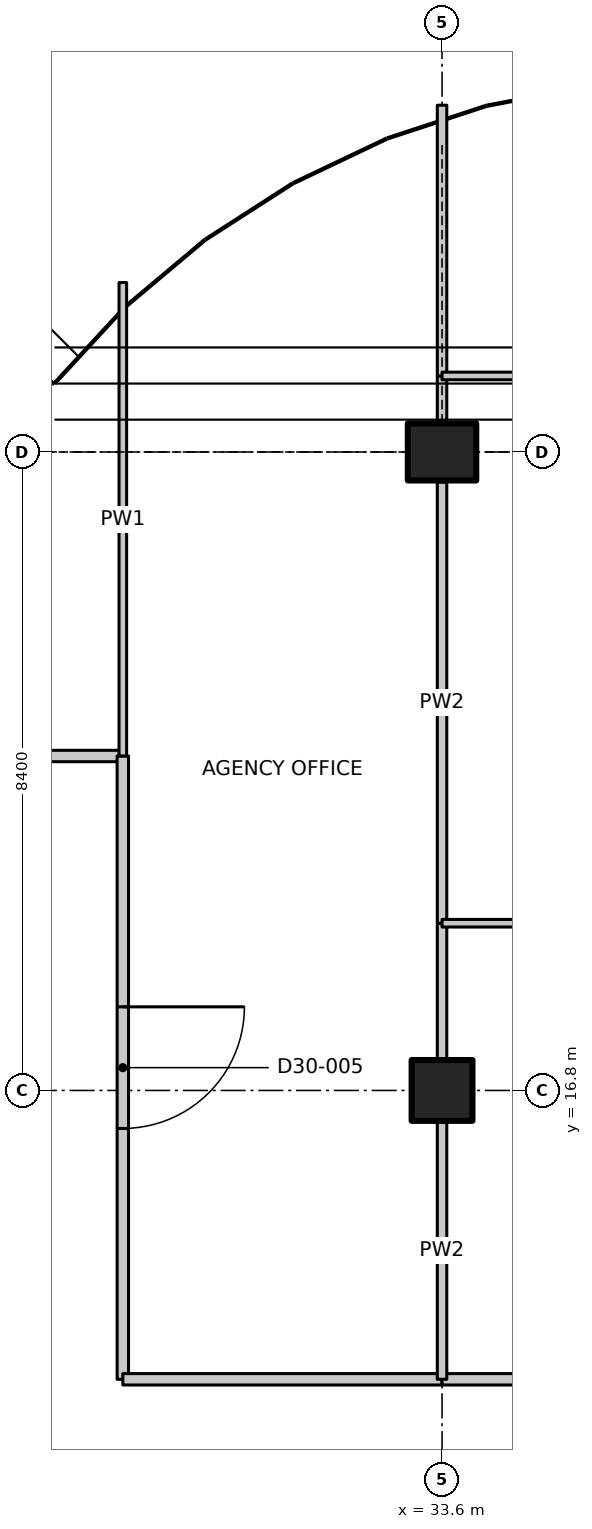
"""IFC4 building model, lengths in metres.
Left out: names, types, materials, properties, quantities, classifications, styles, units other than length and angle.
Written with IfcOpenShell. Run it as: python <this file> out.ifc"""

import sys

from ifc_helpers import new_model, si_unit, direction, frame, frame_2d, origin, origin_2d, place, context, subcontext, project, spatial, polyline, rectangle, outline, extrude, element, fill, save


model = new_model("IFC4")
c1 = context("Model", 3, precision=1e-05, world=origin(), true_north=direction((0.0, 1.0)))
c2 = subcontext(c1, "Body", "Model", "MODEL_VIEW")
j1 = project(units=[si_unit("LENGTHUNIT", "METRE"), si_unit("PLANEANGLEUNIT", "RADIAN")], contexts=[c1])
p1 = place(None, origin())
s1 = spatial("IfcSite", under=j1, at=p1, CompositionType="ELEMENT")
p2 = place(p1, origin())
s2 = spatial("IfcBuilding", under=s1, at=p2, CompositionType="ELEMENT")
p3 = place(p2, frame((0.0, 0.0, 244.5)))
s3 = spatial("IfcBuildingStorey", under=s2, at=p3, CompositionType="ELEMENT", Elevation=244.5)
p4 = place(p3, frame((33.6, 16.8, 0.0), z_axis=(0.0, 0.0, 1.0), x_axis=(1.0, 0.0, 0.0)))
e1 = element("IfcColumn", 1, at=p4, inside=s3, PredefinedType="COLUMN", context=c2, shape_type="SweptSolid", body=[
    extrude(rectangle(XDim=0.8, YDim=0.8, at=origin_2d()), origin(), (0.0, 0.0, 1.0), 3.35),
])
p5 = place(p3, frame((33.6, 25.2, 0.0), z_axis=(0.0, 0.0, 1.0), x_axis=(0.0, 1.0, 0.0)))
e2 = element("IfcColumn", 2, at=p5, inside=s3, PredefinedType="COLUMN", context=c2, shape_type="SweptSolid", body=[
    extrude(rectangle(XDim=0.75, YDim=0.9, at=origin_2d()), origin(), (0.0, 0.0, 1.0), 3.35),
])
p6 = place(p3, frame((25.2, 21.2, 0.0), z_axis=(0.0, 0.0, 1.0), x_axis=(1.0, 0.0, 0.0)))
e3 = element("IfcWall", 3, at=p6, inside=s3, PredefinedType="PARTITIONING", context=c2, shape_type="SweptSolid", body=[
    extrude(rectangle(XDim=4.2, YDim=0.15, at=frame_2d((2.1, 0.0))), origin(), (0.0, 0.0, 1.0), 3.33),
])
p7 = place(p6, frame((1.5, 0.0, 0.0)))
e4 = element("IfcOpeningElement", 4, at=p7, cuts=e3, PredefinedType="OPENING", context=c2, shape_type="SweptSolid", body=[
    extrude(rectangle(XDim=1.0, YDim=2.1, at=frame_2d((0.5, 1.05))), frame((0.0, 0.085, 0.0), z_axis=(0.0, -1.0, 0.0), x_axis=(1.0, 0.0, 0.0)), (0.0, 0.0, 1.0), 0.17),
])
p8 = place(p3, frame((29.4, 21.2, 0.0), z_axis=(0.0, 0.0, 1.0), x_axis=(0.0, -1.0, 0.0)))
e5 = element("IfcWall", 5, at=p8, inside=s3, PredefinedType="PARTITIONING", context=c2, shape_type="SweptSolid", body=[
    extrude(rectangle(XDim=8.2, YDim=0.15, at=frame_2d((4.1, 0.0))), origin(), (0.0, 0.0, 1.0), 3.33),
])
p9 = place(p8, frame((3.3, 0.0, 0.0)))
e6 = element("IfcOpeningElement", 6, at=p9, cuts=e5, PredefinedType="OPENING", context=c2, shape_type="SweptSolid", body=[
    extrude(rectangle(XDim=1.6, YDim=2.1, at=frame_2d((0.8, 1.05))), frame((0.0, 0.085, 0.0), z_axis=(0.0, -1.0, 0.0), x_axis=(1.0, 0.0, 0.0)), (0.0, 0.0, 1.0), 0.17),
])
p10 = place(p3, frame((29.4, 27.429, 0.0), z_axis=(0.0, 0.0, 1.0), x_axis=(0.0, -1.0, 0.0)))
e7 = element("IfcWall", 7, at=p10, inside=s3, PredefinedType="PARTITIONING", context=c2, shape_type="SweptSolid", body=[
    extrude(outline(polyline([(0.0, 0.0), (6.229, 0.0), (6.229, 3.33), (2.679, 3.33), (2.677, 2.98), (1.781, 2.98), (1.779, 3.33), (0.154, 3.33), (0.0, 3.33), (0.0, 0.0)])), frame((0.0, 0.05, 0.0), z_axis=(0.0, -1.0, 0.0), x_axis=(1.0, 0.0, 0.0)), (0.0, 0.0, 1.0), 0.1),
])
p11 = place(p3, frame((29.4, 13.0, 0.0), z_axis=(0.0, 0.0, 1.0), x_axis=(1.0, 0.0, 0.0)))
e8 = element("IfcWall", 8, at=p11, inside=s3, PredefinedType="PARTITIONING", context=c2, shape_type="SweptSolid", body=[
    extrude(rectangle(XDim=4.2, YDim=0.15, at=frame_2d((2.1, 0.0))), origin(), (0.0, 0.0, 1.0), 3.33),
])
p12 = place(p3, frame((33.6, 13.0, 0.0), z_axis=(0.0, 0.0, 1.0), x_axis=(1.0, 0.0, 0.0)))
e9 = element("IfcWall", 9, at=p12, inside=s3, PredefinedType="PARTITIONING", context=c2, shape_type="SweptSolid", body=[
    extrude(rectangle(XDim=4.2, YDim=0.15, at=frame_2d((2.1, 0.0))), origin(), (0.0, 0.0, 1.0), 3.33),
])
p13 = place(p3, frame((33.6, 19.0, 0.0), z_axis=(0.0, 0.0, 1.0), x_axis=(0.0, -1.0, 0.0)))
e10 = element("IfcWall", 10, at=p13, inside=s3, PredefinedType="PARTITIONING", context=c2, shape_type="SweptSolid", body=[
    extrude(rectangle(XDim=1.78, YDim=0.125, at=frame_2d((0.89, 0.0))), origin(), (0.0, 0.0, 1.0), 3.33),
])
p14 = place(p3, frame((33.6, 16.38, 0.0), z_axis=(0.0, 0.0, 1.0), x_axis=(0.0, -1.0, 0.0)))
e11 = element("IfcWall", 11, at=p14, inside=s3, PredefinedType="PARTITIONING", context=c2, shape_type="SweptSolid", body=[
    extrude(rectangle(XDim=3.38, YDim=0.125, at=frame_2d((1.69, 0.0))), origin(), (0.0, 0.0, 1.0), 3.33),
])
p15 = place(p3, frame((33.6, 26.2, 0.0), z_axis=(0.0, 0.0, 1.0), x_axis=(0.0, -1.0, 0.0)))
e12 = element("IfcWall", 12, at=p15, inside=s3, PredefinedType="PARTITIONING", context=c2, shape_type="SweptSolid", body=[
    extrude(rectangle(XDim=0.605, YDim=0.125, at=frame_2d((0.302, 0.0))), origin(), (0.0, 0.0, 1.0), 2.98),
])
p16 = place(p3, frame((33.6, 24.805, 0.0), z_axis=(0.0, 0.0, 1.0), x_axis=(0.0, -1.0, 0.0)))
e13 = element("IfcWall", 13, at=p16, inside=s3, PredefinedType="PARTITIONING", context=c2, shape_type="SweptSolid", body=[
    extrude(outline(polyline([(0.0, 0.0), (5.805, 0.0), (5.805, 3.33), (0.055, 3.33), (0.053, 2.98), (0.0, 2.98), (0.0, 0.0)])), frame((0.0, 0.062, 0.0), z_axis=(0.0, -1.0, 0.0), x_axis=(1.0, 0.0, 0.0)), (0.0, 0.0, 1.0), 0.125),
])
p17 = place(p3, frame((33.6, 29.762, 0.0), z_axis=(0.0, 0.0, 1.0), x_axis=(0.0, -1.0, 0.0)))
e14 = element("IfcWall", 14, at=p17, inside=s3, PredefinedType="PARTITIONING", context=c2, shape_type="SweptSolid", body=[
    extrude(rectangle(XDim=3.562, YDim=0.125, at=frame_2d((1.781, 0.0))), origin(), (0.0, 0.0, 1.0), 2.98),
])
p18 = place(p3, frame((33.6, 19.0, 0.0), z_axis=(0.0, 0.0, 1.0), x_axis=(1.0, 0.0, 0.0)))
e15 = element("IfcWall", 15, at=p18, inside=s3, PredefinedType="PARTITIONING", context=c2, shape_type="SweptSolid", body=[
    extrude(rectangle(XDim=4.2, YDim=0.1, at=frame_2d((2.1, 0.0))), origin(), (0.0, 0.0, 1.0), 3.33),
])
p19 = place(p3, frame((33.6, 26.2, 0.0), z_axis=(0.0, 0.0, 1.0), x_axis=(1.0, 0.0, 0.0)))
e16 = element("IfcWall", 16, at=p19, inside=s3, PredefinedType="PARTITIONING", context=c2, shape_type="SweptSolid", body=[
    extrude(rectangle(XDim=4.2, YDim=0.1, at=frame_2d((2.1, 0.0))), origin(), (0.0, 0.0, 1.0), 2.98),
])
p20 = place(p19, frame((1.8, 0.0, 0.0)))
e17 = element("IfcOpeningElement", 17, at=p20, cuts=e16, PredefinedType="OPENING", context=c2, shape_type="SweptSolid", body=[
    extrude(rectangle(XDim=0.9, YDim=2.1, at=frame_2d((0.45, 1.05))), frame((0.0, 0.06, 0.0), z_axis=(0.0, -1.0, 0.0), x_axis=(1.0, 0.0, 0.0)), (0.0, 0.0, 1.0), 0.12),
])
p21 = place(p9, origin())
e18 = element("IfcDoor", 18, at=p21, inside=s3, OperationType="DOUBLE_DOOR_SINGLE_SWING", PredefinedType="DOOR", context=c2, shape_type="SweptSolid", body=[
    extrude(rectangle(XDim=1.6, YDim=2.1, at=frame_2d((0.8, 1.05))), frame((0.0, 0.025, 0.0), z_axis=(0.0, -1.0, 0.0), x_axis=(1.0, 0.0, 0.0)), (0.0, 0.0, 1.0), 0.05),
])
fill(e6, e18)
save(model, sys.argv[1])
